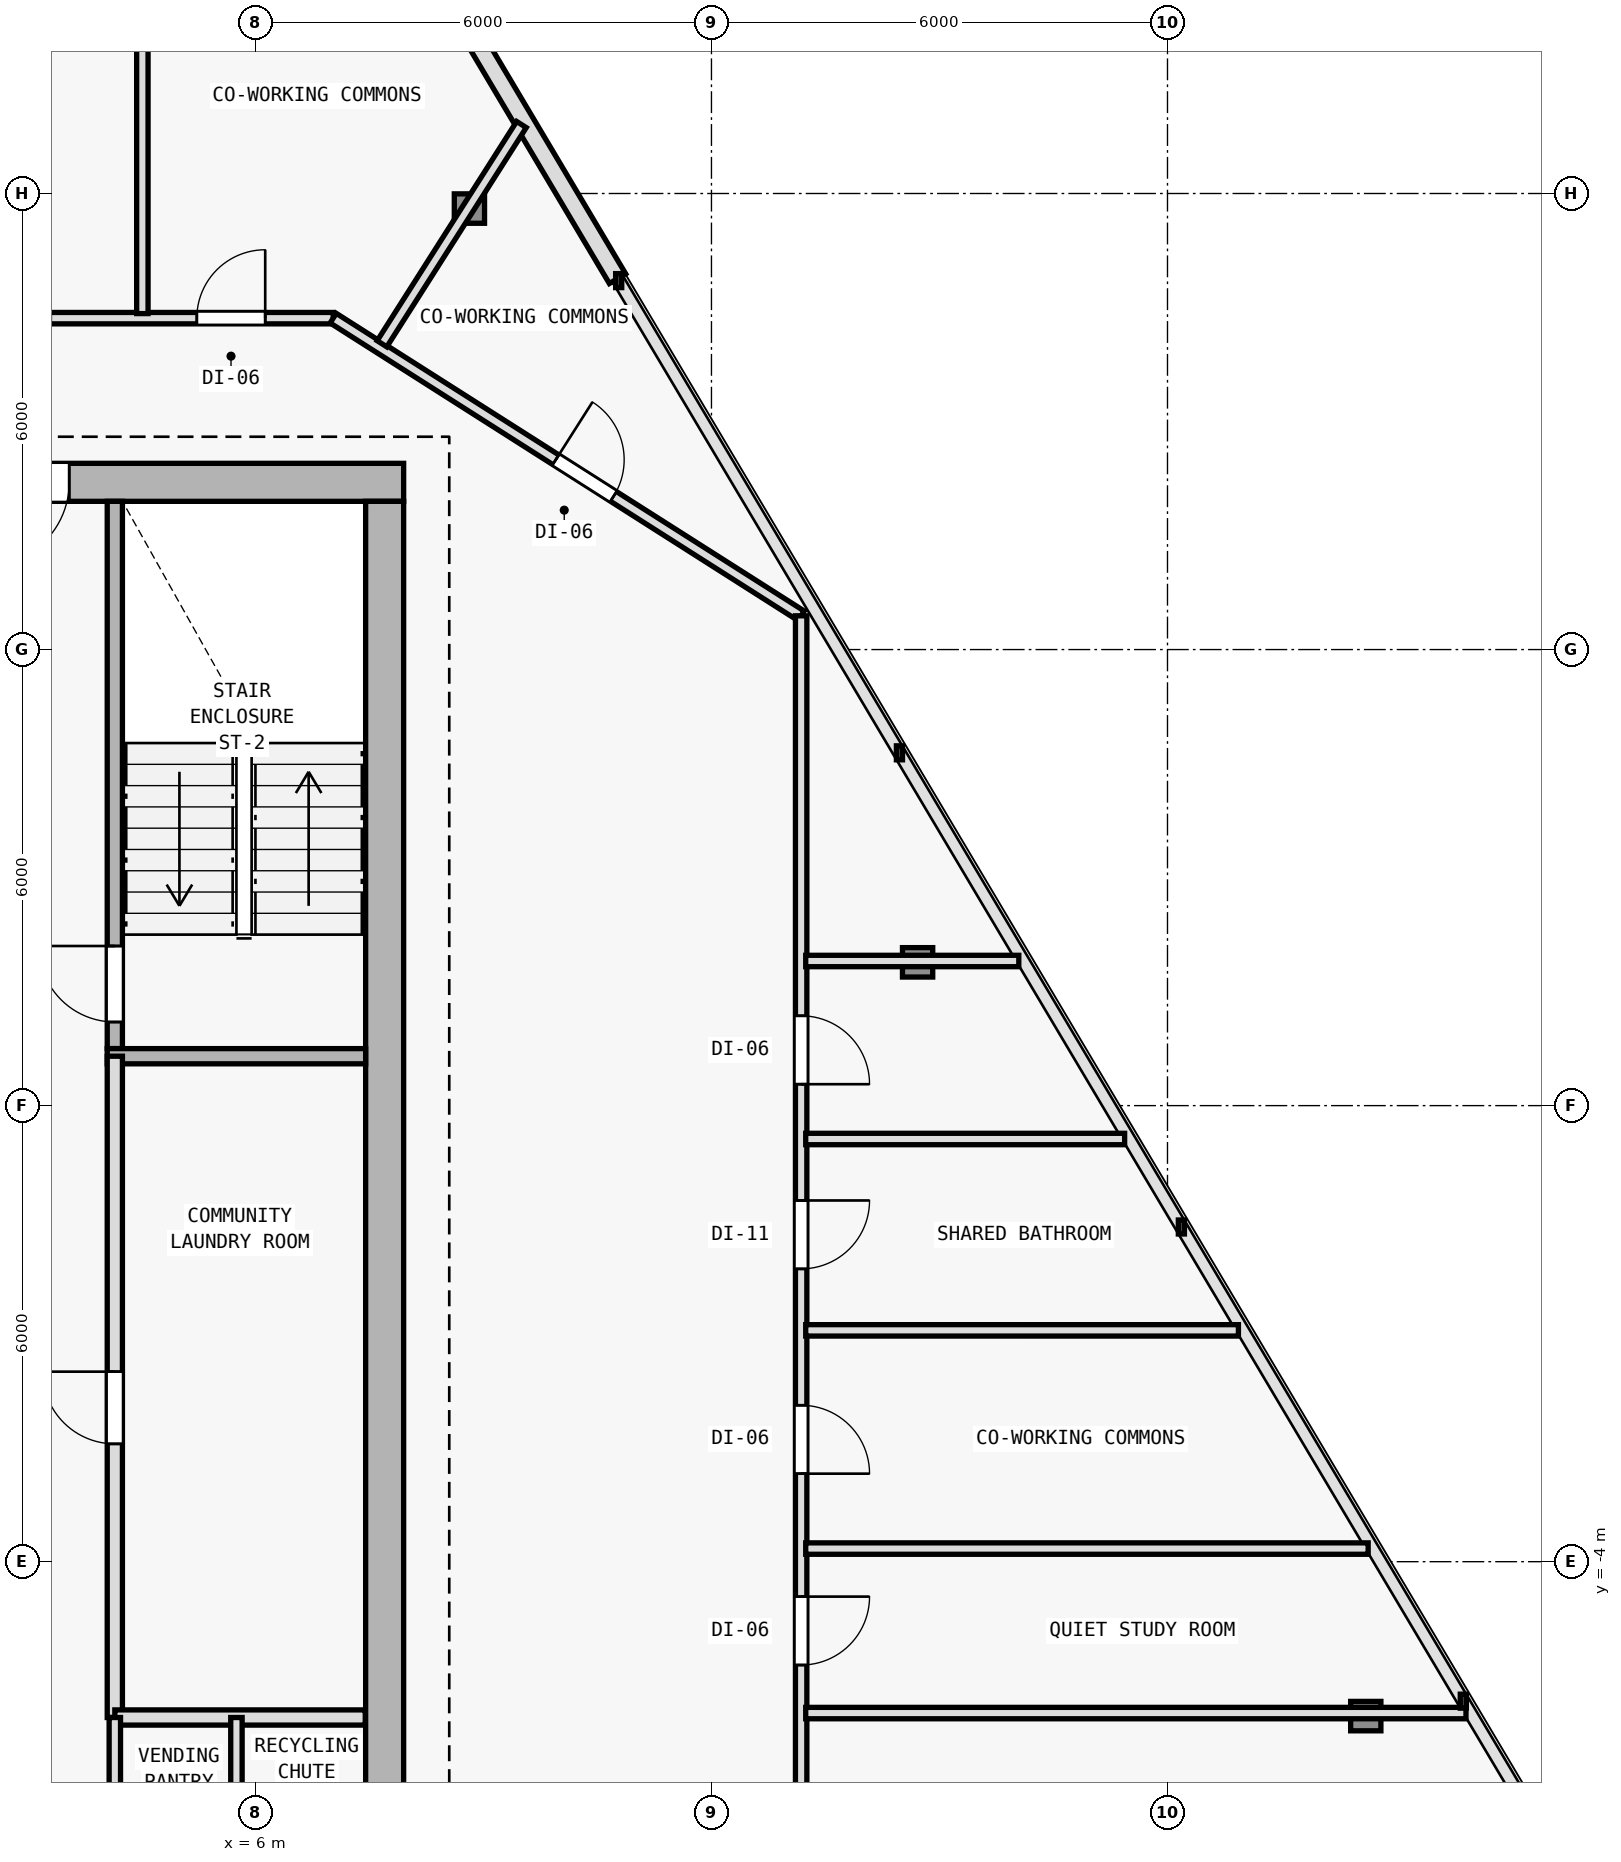
"""IFC4 building model, lengths in metres.
Left out: names, types, materials, properties, quantities, classifications, styles, units other than length and angle.
Written with IfcOpenShell. Run it as: python <this file> out.ifc"""

import sys

from ifc_helpers import new_model, si_unit, direction, frame, frame_2d, origin, origin_2d, place, context, subcontext, project, spatial, rectangle, i_section, extrude, element, fill, save


model = new_model("IFC4")
c1 = context("Model", 3, precision=1e-05, world=origin(), true_north=direction((0.0, 1.0)))
c2 = subcontext(c1, "Body", "Model", "MODEL_VIEW")
j1 = project(units=[si_unit("LENGTHUNIT", "METRE"), si_unit("PLANEANGLEUNIT", "RADIAN")], contexts=[c1])
p1 = place(None, origin())
s1 = spatial("IfcSite", under=j1, at=p1, CompositionType="ELEMENT")
p2 = place(p1, origin())
s2 = spatial("IfcBuilding", under=s1, at=p2, CompositionType="ELEMENT")
p3 = place(p2, frame((0.0, 0.0, 209.1)))
s3 = spatial("IfcBuildingStorey", under=s2, at=p3, CompositionType="ELEMENT", Elevation=209.1)
for number, where, z_axis, x_axis in (
    (1, (7.7, 10.2, 0.0), (0.0, 0.0, 1.0), (1.0, 0.0, 0.0)),
    (2, (7.7, 0.4, 0.0), (0.0, 0.0, 1.0), (1.0, 0.0, 0.0)),
):
    element("IfcColumn", number, at=place(p3, frame(where, z_axis=z_axis, x_axis=x_axis)), inside=s3, PredefinedType="COLUMN", context=c2, shape_type="SweptSolid", body=[
        extrude(i_section(OverallWidth=0.398, OverallDepth=0.387, WebThickness=0.013, FlangeThickness=0.022, FilletRadius=0.015, at=origin_2d()), origin(), (0.0, 0.0, 1.0), 3.6),
    ])
p4 = place(p3, frame((20.609, -6.031, 0.005), z_axis=(-0.026852630098, 0.022161917499, 0.99939370904), x_axis=(-0.636528167794, -0.771253454842, 0.0)))
e3 = element("IfcColumn", 3, at=p4, inside=s3, PredefinedType="COLUMN", context=c2, shape_type="SweptSolid", body=[
    extrude(i_section(OverallWidth=0.398, OverallDepth=0.387, WebThickness=0.013, FlangeThickness=0.022, FilletRadius=0.015, at=origin_2d()), origin(), (0.0, 0.0, 1.0), 3.591),
])
p5 = place(p3, frame((14.712, 3.885, 0.005), z_axis=(-0.019517813249, 0.009860916102, 0.999760880061), x_axis=(-0.450941633442, -0.892553439985, 0.0)))
e4 = element("IfcColumn", 4, at=p5, inside=s3, PredefinedType="COLUMN", context=c2, shape_type="SweptSolid", body=[
    extrude(i_section(OverallWidth=0.398, OverallDepth=0.387, WebThickness=0.013, FlangeThickness=0.022, FilletRadius=0.015, at=origin_2d()), origin(), (0.0, 0.0, 1.0), 3.59),
])
p6 = place(p3, frame((8.815, 13.802, 0.005), z_axis=(-0.012039084492, -0.002584662207, 0.999924187109), x_axis=(0.209906311695, -0.977721504474, 0.0)))
e5 = element("IfcColumn", 5, at=p6, inside=s3, PredefinedType="COLUMN", context=c2, shape_type="SweptSolid", body=[
    extrude(i_section(OverallWidth=0.398, OverallDepth=0.387, WebThickness=0.013, FlangeThickness=0.022, FilletRadius=0.015, at=origin_2d()), origin(), (0.0, 0.0, 1.0), 3.589),
])
p7 = place(p3, frame((5.551, 21.647, 0.0), z_axis=(0.0, 0.0, 1.0), x_axis=(0.511094988088, -0.859524236512, 0.0)))
e6 = element("IfcWall", 6, at=p7, inside=s3, PredefinedType="SOLIDWALL", context=c2, shape_type="SweptSolid", body=[
    extrude(rectangle(XDim=10.2, YDim=0.25, at=frame_2d((5.1, 0.0))), origin(), (0.0, 0.0, 1.0), 3.35),
])
p8 = place(p7, frame((4.35, 0.0, 0.62)))
e7 = element("IfcOpeningElement", 7, at=p8, cuts=e6, PredefinedType="OPENING", context=c2, shape_type="SweptSolid", body=[
    extrude(rectangle(XDim=1.5, YDim=2.0, at=frame_2d((0.75, 1.0))), frame((0.0, 0.135, 0.0), z_axis=(0.0, -1.0, 0.0), x_axis=(1.0, 0.0, 0.0)), (0.0, 0.0, 1.0), 0.27),
])
p9 = place(p3, frame((7.95, 10.2, 0.0), z_axis=(0.0, 0.0, 1.0), x_axis=(-1.0, 0.0, 0.0)))
e8 = element("IfcWall", 8, at=p9, inside=s3, PredefinedType="SHEAR", context=c2, shape_type="SweptSolid", body=[
    extrude(rectangle(XDim=15.9, YDim=0.5, at=frame_2d((7.95, 0.0))), origin(), (0.0, 0.0, 1.0), 3.35),
])
p10 = place(p9, frame((4.4, 0.0, 0.0)))
e9 = element("IfcOpeningElement", 9, at=p10, cuts=e8, PredefinedType="OPENING", context=c2, shape_type="SweptSolid", body=[
    extrude(rectangle(XDim=1.1, YDim=2.15, at=frame_2d((0.55, 1.075))), frame((0.0, 0.26, 0.0), z_axis=(0.0, -1.0, 0.0), x_axis=(1.0, 0.0, 0.0)), (0.0, 0.0, 1.0), 0.52),
])
p11 = place(p3, frame((7.7, 9.95, 0.0), z_axis=(0.0, 0.0, 1.0), x_axis=(0.0, -1.0, 0.0)))
e10 = element("IfcWall", 10, at=p11, inside=s3, PredefinedType="SHEAR", context=c2, shape_type="SweptSolid", body=[
    extrude(rectangle(XDim=19.1, YDim=0.5, at=frame_2d((9.55, 0.0))), origin(), (0.0, 0.0, 1.0), 3.35),
])
p12 = place(p3, frame((4.15, 2.75, 0.0), z_axis=(0.0, 0.0, 1.0), x_axis=(0.0, 1.0, 0.0)))
e11 = element("IfcWall", 11, at=p12, inside=s3, PredefinedType="SOLIDWALL", context=c2, shape_type="SweptSolid", body=[
    extrude(rectangle(XDim=7.2, YDim=0.2, at=frame_2d((3.6, 0.0))), origin(), (0.0, 0.0, 1.0), 3.35),
])
p13 = place(p12, frame((0.35, 0.0, 0.0)))
e12 = element("IfcOpeningElement", 12, at=p13, cuts=e11, PredefinedType="OPENING", context=c2, shape_type="SweptSolid", body=[
    extrude(rectangle(XDim=1.0, YDim=2.15, at=frame_2d((0.5, 1.075))), frame((0.0, 0.11, 0.0), z_axis=(0.0, -1.0, 0.0), x_axis=(1.0, 0.0, 0.0)), (0.0, 0.0, 1.0), 0.22),
])
p14 = place(p3, frame((4.05, 2.65, 0.0), z_axis=(0.0, 0.0, 1.0), x_axis=(1.0, 0.0, 0.0)))
e13 = element("IfcWall", 13, at=p14, inside=s3, PredefinedType="SOLIDWALL", context=c2, shape_type="SweptSolid", body=[
    extrude(rectangle(XDim=3.4, YDim=0.2, at=frame_2d((1.7, 0.0))), origin(), (0.0, 0.0, 1.0), 3.35),
])
p15 = place(p3, frame((4.15, -6.05, 0.0), z_axis=(0.0, 0.0, 1.0), x_axis=(0.0, 1.0, 0.0)))
e14 = element("IfcWall", 14, at=p15, inside=s3, PredefinedType="SOLIDWALL", context=c2, shape_type="SweptSolid", body=[
    extrude(rectangle(XDim=8.7, YDim=0.2, at=frame_2d((4.35, 0.0))), origin(), (0.0, 0.0, 1.0), 3.35),
])
p16 = place(p15, frame((3.6, 0.0, 0.0)))
e15 = element("IfcOpeningElement", 15, at=p16, cuts=e14, PredefinedType="OPENING", context=c2, shape_type="SweptSolid", body=[
    extrude(rectangle(XDim=0.95, YDim=2.1, at=frame_2d((0.475, 1.05))), frame((0.0, 0.11, 0.0), z_axis=(0.0, -1.0, 0.0), x_axis=(1.0, 0.0, 0.0)), (0.0, 0.0, 1.0), 0.22),
])
p17 = place(p3, frame((4.15, -6.05, 0.0), z_axis=(0.0, 0.0, 1.0), x_axis=(1.0, 0.0, 0.0)))
e16 = element("IfcWall", 16, at=p17, inside=s3, PredefinedType="SOLIDWALL", context=c2, shape_type="SweptSolid", body=[
    extrude(rectangle(XDim=3.295, YDim=0.2, at=frame_2d((1.647, 0.0))), origin(), (0.0, 0.0, 1.0), 3.35),
])
p18 = place(p3, frame((4.15, -9.145, 0.0), z_axis=(0.0, 0.0, 1.0), x_axis=(0.0, 1.0, 0.0)))
e17 = element("IfcWall", 17, at=p18, inside=s3, PredefinedType="PARTITIONING", context=c2, shape_type="SweptSolid", body=[
    extrude(rectangle(XDim=3.095, YDim=0.15, at=frame_2d((1.547, 0.0))), origin(), (0.0, 0.0, 1.0), 3.35),
])
p19 = place(p18, frame((0.845, 0.0, 0.0)))
e18 = element("IfcOpeningElement", 18, at=p19, cuts=e17, PredefinedType="OPENING", context=c2, shape_type="SweptSolid", body=[
    extrude(rectangle(XDim=0.9, YDim=2.1, at=frame_2d((0.45, 1.05))), frame((0.0, 0.085, 0.0), z_axis=(0.0, -1.0, 0.0), x_axis=(1.0, 0.0, 0.0)), (0.0, 0.0, 1.0), 0.17),
])
p20 = place(p3, frame((5.75, -9.145, 0.0), z_axis=(0.0, 0.0, 1.0), x_axis=(0.0, 1.0, 0.0)))
e19 = element("IfcWall", 19, at=p20, inside=s3, PredefinedType="PARTITIONING", context=c2, shape_type="SweptSolid", body=[
    extrude(rectangle(XDim=3.095, YDim=0.15, at=frame_2d((1.547, 0.0))), origin(), (0.0, 0.0, 1.0), 3.35),
])
p21 = place(p20, frame((0.845, 0.0, 0.0)))
e20 = element("IfcOpeningElement", 20, at=p21, cuts=e19, PredefinedType="OPENING", context=c2, shape_type="SweptSolid", body=[
    extrude(rectangle(XDim=0.9, YDim=2.1, at=frame_2d((0.45, 1.05))), frame((0.0, 0.085, 0.0), z_axis=(0.0, -1.0, 0.0), x_axis=(1.0, 0.0, 0.0)), (0.0, 0.0, 1.0), 0.17),
])
p22 = place(p3, frame((-7.041, 12.36, 0.0), z_axis=(0.0, 0.0, 1.0), x_axis=(1.0, 0.0, 0.0)))
e21 = element("IfcWall", 21, at=p22, inside=s3, PredefinedType="PARTITIONING", context=c2, shape_type="SweptSolid", body=[
    extrude(rectangle(XDim=14.064, YDim=0.15, at=frame_2d((7.032, 0.0))), origin(), (0.0, 0.0, 1.0), 2.975),
])
p23 = place(p22, frame((12.27, 0.0, 0.0)))
e22 = element("IfcOpeningElement", 22, at=p23, cuts=e21, PredefinedType="OPENING", context=c2, shape_type="SweptSolid", body=[
    extrude(rectangle(XDim=0.9, YDim=2.1, at=frame_2d((0.45, 1.05))), frame((0.0, 0.085, 0.0), z_axis=(0.0, -1.0, 0.0), x_axis=(1.0, 0.0, 0.0)), (0.0, 0.0, 1.0), 0.17),
])
p24 = place(p22, frame((9.448, 0.0, 0.0)))
e23 = element("IfcOpeningElement", 23, at=p24, cuts=e21, PredefinedType="OPENING", context=c2, shape_type="SweptSolid", body=[
    extrude(rectangle(XDim=0.9, YDim=2.1, at=frame_2d((0.45, 1.05))), frame((0.0, 0.085, 0.0), z_axis=(0.0, -1.0, 0.0), x_axis=(1.0, 0.0, 0.0)), (0.0, 0.0, 1.0), 0.17),
])
p25 = place(p22, frame((6.619, 0.0, 0.0)))
e24 = element("IfcOpeningElement", 24, at=p25, cuts=e21, PredefinedType="OPENING", context=c2, shape_type="SweptSolid", body=[
    extrude(rectangle(XDim=0.9, YDim=2.1, at=frame_2d((0.45, 1.05))), frame((0.0, 0.085, 0.0), z_axis=(0.0, -1.0, 0.0), x_axis=(1.0, 0.0, 0.0)), (0.0, 0.0, 1.0), 0.17),
])
p26 = place(p22, frame((2.806, 0.0, 0.0)))
e25 = element("IfcOpeningElement", 25, at=p26, cuts=e21, PredefinedType="OPENING", context=c2, shape_type="SweptSolid", body=[
    extrude(rectangle(XDim=0.9, YDim=2.1, at=frame_2d((0.45, 1.05))), frame((0.0, 0.085, 0.0), z_axis=(0.0, -1.0, 0.0), x_axis=(1.0, 0.0, 0.0)), (0.0, 0.0, 1.0), 0.17),
])
p27 = place(p3, frame((7.023, 12.36, 0.0), z_axis=(0.0, 0.0, 1.0), x_axis=(0.84376480085, -0.536713108511, 0.0)))
e26 = element("IfcWall", 26, at=p27, inside=s3, PredefinedType="PARTITIONING", context=c2, shape_type="SweptSolid", body=[
    extrude(rectangle(XDim=7.297, YDim=0.15, at=frame_2d((3.648, 0.0))), origin(), (0.0, 0.0, 1.0), 2.975),
])
p28 = place(p27, frame((3.47, 0.0, 0.0)))
e27 = element("IfcOpeningElement", 27, at=p28, cuts=e26, PredefinedType="OPENING", context=c2, shape_type="SweptSolid", body=[
    extrude(rectangle(XDim=0.9, YDim=2.1, at=frame_2d((0.45, 1.05))), frame((0.0, 0.085, 0.0), z_axis=(0.0, -1.0, 0.0), x_axis=(1.0, 0.0, 0.0)), (0.0, 0.0, 1.0), 0.17),
])
p29 = place(p3, frame((13.18, 8.444, 0.0), z_axis=(0.0, 0.0, 1.0), x_axis=(0.0, -1.0, 0.0)))
e28 = element("IfcWall", 28, at=p29, inside=s3, PredefinedType="PARTITIONING", context=c2, shape_type="SweptSolid", body=[
    extrude(rectangle(XDim=20.004, YDim=0.15, at=frame_2d((10.002, 0.0))), origin(), (0.0, 0.0, 1.0), 2.825),
])
p30 = place(p29, frame((12.904, 0.0, 0.0)))
e29 = element("IfcOpeningElement", 29, at=p30, cuts=e28, PredefinedType="OPENING", context=c2, shape_type="SweptSolid", body=[
    extrude(rectangle(XDim=0.9, YDim=2.1, at=frame_2d((0.45, 1.05))), frame((0.0, 0.085, 0.0), z_axis=(0.0, -1.0, 0.0), x_axis=(1.0, 0.0, 0.0)), (0.0, 0.0, 1.0), 0.17),
])
p31 = place(p29, frame((10.386, 0.0, 0.0)))
e30 = element("IfcOpeningElement", 30, at=p31, cuts=e28, PredefinedType="OPENING", context=c2, shape_type="SweptSolid", body=[
    extrude(rectangle(XDim=0.9, YDim=2.1, at=frame_2d((0.45, 1.05))), frame((0.0, 0.085, 0.0), z_axis=(0.0, -1.0, 0.0), x_axis=(1.0, 0.0, 0.0)), (0.0, 0.0, 1.0), 0.17),
])
p32 = place(p29, frame((7.692, 0.0, 0.0)))
e31 = element("IfcOpeningElement", 31, at=p32, cuts=e28, PredefinedType="OPENING", context=c2, shape_type="SweptSolid", body=[
    extrude(rectangle(XDim=0.9, YDim=2.1, at=frame_2d((0.45, 1.05))), frame((0.0, 0.085, 0.0), z_axis=(0.0, -1.0, 0.0), x_axis=(1.0, 0.0, 0.0)), (0.0, 0.0, 1.0), 0.17),
])
p33 = place(p29, frame((5.262, 0.0, 0.0)))
e32 = element("IfcOpeningElement", 32, at=p33, cuts=e28, PredefinedType="OPENING", context=c2, shape_type="SweptSolid", body=[
    extrude(rectangle(XDim=0.9, YDim=2.1, at=frame_2d((0.45, 1.05))), frame((0.0, 0.085, 0.0), z_axis=(0.0, -1.0, 0.0), x_axis=(1.0, 0.0, 0.0)), (0.0, 0.0, 1.0), 0.17),
])
p34 = place(p3, frame((13.24, -5.992, 0.0), z_axis=(0.0, 0.0, 1.0), x_axis=(1.0, 0.0, 0.0)))
e33 = element("IfcWall", 33, at=p34, inside=s3, PredefinedType="PARTITIONING", context=c2, shape_type="SweptSolid", body=[
    extrude(rectangle(XDim=8.687, YDim=0.15, at=frame_2d((4.344, 0.0))), origin(), (0.0, 0.0, 1.0), 2.825),
])
p35 = place(p3, frame((13.24, 3.903, 0.0), z_axis=(0.0, 0.0, 1.0), x_axis=(1.0, 0.0, 0.0)))
e34 = element("IfcWall", 34, at=p35, inside=s3, PredefinedType="PARTITIONING", context=c2, shape_type="SweptSolid", body=[
    extrude(rectangle(XDim=2.804, YDim=0.15, at=frame_2d((1.402, 0.0))), origin(), (0.0, 0.0, 1.0), 2.975),
])
p36 = place(p3, frame((7.665, 12.023, 0.0), z_axis=(0.0, 0.0, 1.0), x_axis=(0.536741480684, 0.843746752831, 0.0)))
e35 = element("IfcWall", 35, at=p36, inside=s3, PredefinedType="PARTITIONING", context=c2, shape_type="SweptSolid", body=[
    extrude(rectangle(XDim=3.419, YDim=0.15, at=frame_2d((1.709, 0.0))), origin(), (0.0, 0.0, 1.0), 2.975),
])
p37 = place(p3, frame((13.24, -0.957, 0.0), z_axis=(0.0, 0.0, 1.0), x_axis=(1.0, 0.0, 0.0)))
e36 = element("IfcWall", 36, at=p37, inside=s3, PredefinedType="PARTITIONING", context=c2, shape_type="SweptSolid", body=[
    extrude(rectangle(XDim=5.693, YDim=0.15, at=frame_2d((2.847, 0.0))), origin(), (0.0, 0.0, 1.0), 2.975),
])
p38 = place(p3, frame((13.24, -3.827, 0.0), z_axis=(0.0, 0.0, 1.0), x_axis=(1.0, 0.0, 0.0)))
e37 = element("IfcWall", 37, at=p38, inside=s3, PredefinedType="PARTITIONING", context=c2, shape_type="SweptSolid", body=[
    extrude(rectangle(XDim=7.4, YDim=0.15, at=frame_2d((3.7, 0.0))), origin(), (0.0, 0.0, 1.0), 2.975),
])
p39 = place(p3, frame((13.24, 1.561, 0.0), z_axis=(0.0, 0.0, 1.0), x_axis=(1.0, 0.0, 0.0)))
e38 = element("IfcWall", 38, at=p39, inside=s3, PredefinedType="PARTITIONING", context=c2, shape_type="SweptSolid", body=[
    extrude(rectangle(XDim=4.196, YDim=0.15, at=frame_2d((2.098, 0.0))), origin(), (0.0, 0.0, 1.0), 2.975),
])
p40 = place(p3, frame((4.512, 12.42, 0.0), z_axis=(0.0, 0.0, 1.0), x_axis=(0.0, 1.0, 0.0)))
e39 = element("IfcWall", 39, at=p40, inside=s3, PredefinedType="PARTITIONING", context=c2, shape_type="SweptSolid", body=[
    extrude(rectangle(XDim=8.68, YDim=0.15, at=frame_2d((4.34, 0.0))), origin(), (0.0, 0.0, 1.0), 2.975),
])
p41 = place(p10, origin())
e40 = element("IfcDoor", 40, at=p41, inside=s3, OperationType="SINGLE_SWING_RIGHT", PredefinedType="DOOR", context=c2, shape_type="SweptSolid", body=[
    extrude(rectangle(XDim=1.1, YDim=2.15, at=frame_2d((0.55, 1.075))), frame((0.0, 0.025, 0.0), z_axis=(0.0, -1.0, 0.0), x_axis=(1.0, 0.0, 0.0)), (0.0, 0.0, 1.0), 0.05),
])
fill(e9, e40)
p42 = place(p13, origin())
e41 = element("IfcDoor", 41, at=p42, inside=s3, OperationType="SINGLE_SWING_RIGHT", PredefinedType="DOOR", context=c2, shape_type="SweptSolid", body=[
    extrude(rectangle(XDim=1.0, YDim=2.15, at=frame_2d((0.5, 1.075))), frame((0.0, 0.025, 0.0), z_axis=(0.0, -1.0, 0.0), x_axis=(1.0, 0.0, 0.0)), (0.0, 0.0, 1.0), 0.05),
])
fill(e12, e41)
p43 = place(p16, origin())
e42 = element("IfcDoor", 42, at=p43, inside=s3, OperationType="SINGLE_SWING_RIGHT", PredefinedType="DOOR", context=c2, shape_type="SweptSolid", body=[
    extrude(rectangle(XDim=0.95, YDim=2.1, at=frame_2d((0.475, 1.05))), frame((0.0, 0.025, 0.0), z_axis=(0.0, -1.0, 0.0), x_axis=(1.0, 0.0, 0.0)), (0.0, 0.0, 1.0), 0.05),
])
fill(e15, e42)
p44 = place(p30, origin())
e43 = element("IfcDoor", 43, at=p44, inside=s3, OperationType="SINGLE_SWING_LEFT", PredefinedType="DOOR", context=c2, shape_type="SweptSolid", body=[
    extrude(rectangle(XDim=0.9, YDim=2.1, at=frame_2d((0.45, 1.05))), frame((0.0, 0.025, 0.0), z_axis=(0.0, -1.0, 0.0), x_axis=(1.0, 0.0, 0.0)), (0.0, 0.0, 1.0), 0.05),
])
fill(e29, e43)
p45 = place(p31, origin())
e44 = element("IfcDoor", 44, at=p45, inside=s3, OperationType="SINGLE_SWING_RIGHT", PredefinedType="DOOR", context=c2, shape_type="SweptSolid", body=[
    extrude(rectangle(XDim=0.9, YDim=2.1, at=frame_2d((0.45, 1.05))), frame((0.0, 0.025, 0.0), z_axis=(0.0, -1.0, 0.0), x_axis=(1.0, 0.0, 0.0)), (0.0, 0.0, 1.0), 0.05),
])
fill(e30, e44)
p46 = place(p32, origin())
e45 = element("IfcDoor", 45, at=p46, inside=s3, OperationType="SINGLE_SWING_LEFT", PredefinedType="DOOR", context=c2, shape_type="SweptSolid", body=[
    extrude(rectangle(XDim=0.9, YDim=2.1, at=frame_2d((0.45, 1.05))), frame((0.0, 0.025, 0.0), z_axis=(0.0, -1.0, 0.0), x_axis=(1.0, 0.0, 0.0)), (0.0, 0.0, 1.0), 0.05),
])
fill(e31, e45)
p47 = place(p33, origin())
e46 = element("IfcDoor", 46, at=p47, inside=s3, OperationType="SINGLE_SWING_RIGHT", PredefinedType="DOOR", context=c2, shape_type="SweptSolid", body=[
    extrude(rectangle(XDim=0.9, YDim=2.1, at=frame_2d((0.45, 1.05))), frame((0.0, 0.025, 0.0), z_axis=(0.0, -1.0, 0.0), x_axis=(1.0, 0.0, 0.0)), (0.0, 0.0, 1.0), 0.05),
])
fill(e32, e46)
p48 = place(p28, origin())
e47 = element("IfcDoor", 47, at=p48, inside=s3, OperationType="SINGLE_SWING_LEFT", PredefinedType="DOOR", context=c2, shape_type="SweptSolid", body=[
    extrude(rectangle(XDim=0.9, YDim=2.1, at=frame_2d((0.45, 1.05))), frame((0.0, 0.025, 0.0), z_axis=(0.0, -1.0, 0.0), x_axis=(1.0, 0.0, 0.0)), (0.0, 0.0, 1.0), 0.05),
])
fill(e27, e47)
p49 = place(p23, origin())
e48 = element("IfcDoor", 48, at=p49, inside=s3, OperationType="SINGLE_SWING_RIGHT", PredefinedType="DOOR", context=c2, shape_type="SweptSolid", body=[
    extrude(rectangle(XDim=0.9, YDim=2.1, at=frame_2d((0.45, 1.05))), frame((0.0, 0.025, 0.0), z_axis=(0.0, -1.0, 0.0), x_axis=(1.0, 0.0, 0.0)), (0.0, 0.0, 1.0), 0.05),
])
fill(e22, e48)
save(model, sys.argv[1])
